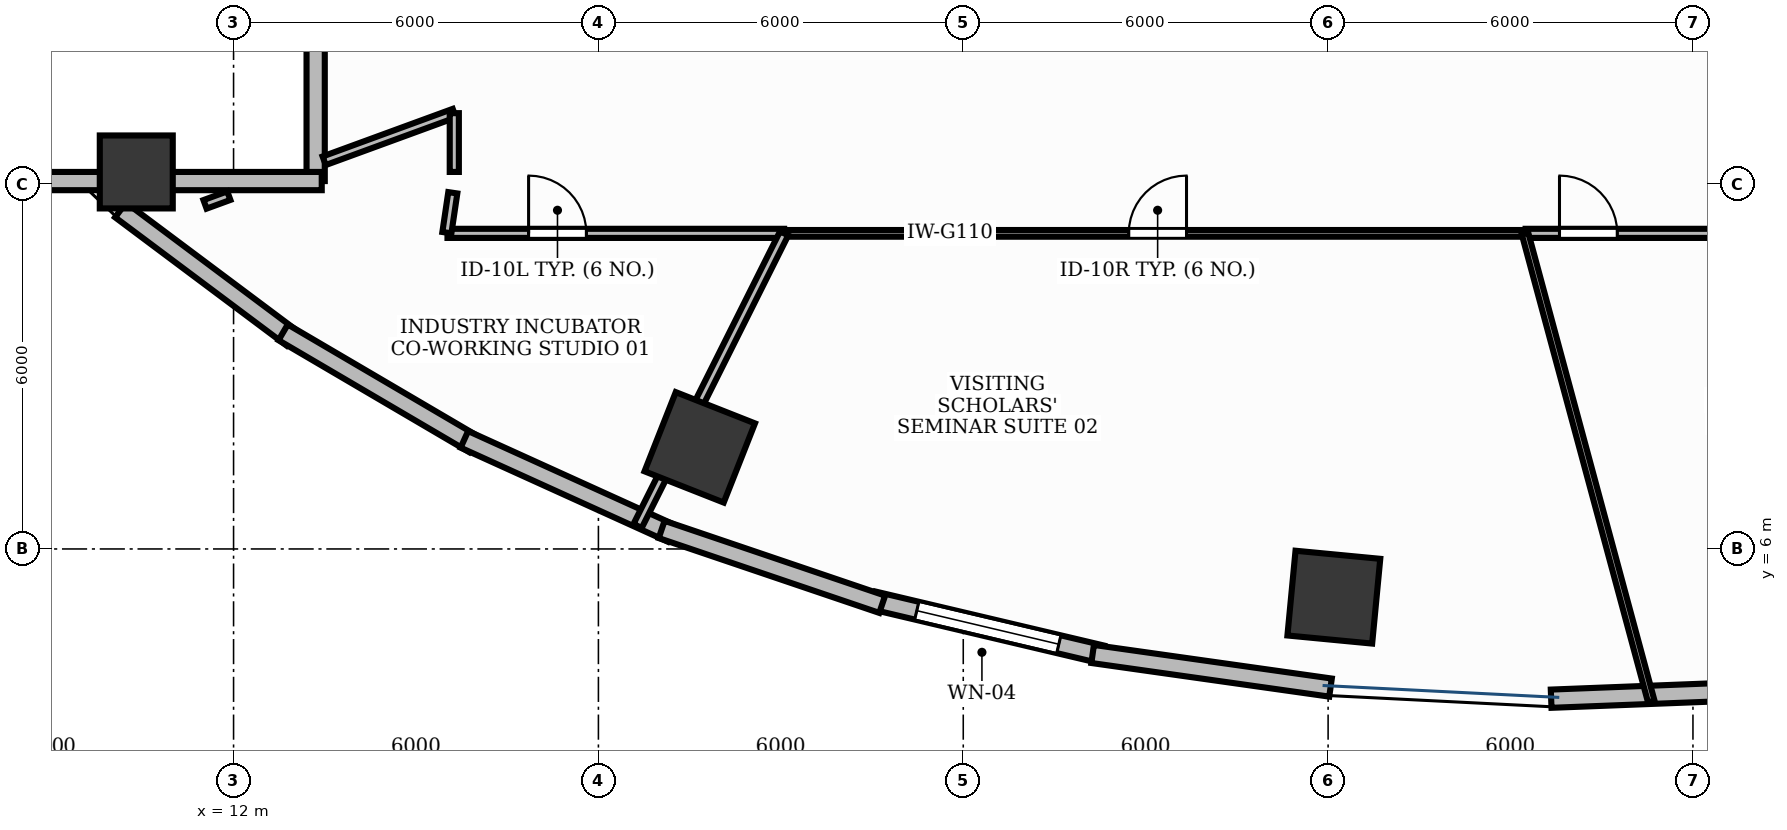
"""IFC4 building model, lengths in metres.
Left out: names, types, materials, properties, quantities, classifications, styles, units other than length and angle.
Written with IfcOpenShell. Run it as: python <this file> out.ifc"""

import sys

from ifc_helpers import new_model, si_unit, direction, frame, frame_2d, origin, origin_2d, place, context, subcontext, project, spatial, rectangle, extrude, element, fill, save


model = new_model("IFC4")
c1 = context("Model", 3, precision=1e-05, world=origin(), true_north=direction((0.0, 1.0)))
c2 = subcontext(c1, "Body", "Model", "MODEL_VIEW")
j1 = project(units=[si_unit("LENGTHUNIT", "METRE"), si_unit("PLANEANGLEUNIT", "RADIAN")], contexts=[c1])
p1 = place(None, origin())
s1 = spatial("IfcSite", under=j1, at=p1, CompositionType="ELEMENT")
p2 = place(p1, origin())
s2 = spatial("IfcBuilding", under=s1, at=p2, CompositionType="ELEMENT")
p3 = place(p2, frame((0.0, 0.0, 15.0)))
s3 = spatial("IfcBuildingStorey", under=s2, at=p3, CompositionType="ELEMENT", Elevation=15.0)
p4 = place(p3, frame((10.4, 12.2, -0.35), z_axis=(0.0, 0.0, 1.0), x_axis=(1.0, 0.0, 0.0)))
e1 = element("IfcColumn", 1, at=p4, inside=s3, PredefinedType="COLUMN", context=c2, shape_type="SweptSolid", body=[
    extrude(rectangle(XDim=1.2, YDim=1.2, at=origin_2d()), origin(), (0.0, 0.0, 1.0), 3.8),
])
for number, where, z_axis, x_axis in (
    (2, (19.667, 7.671, -0.0), (0.0, 0.0, 1.0), (-0.93, 0.367, 0.0)),
    (3, (30.094, 5.208, -0.0), (0.0, 0.0, 1.0), (-0.995, 0.095, 0.0)),
):
    element("IfcColumn", number, at=place(p3, frame(where, z_axis=z_axis, x_axis=x_axis)), inside=s3, PredefinedType="COLUMN", context=c2, shape_type="SweptSolid", body=[
        extrude(rectangle(XDim=1.4, YDim=1.4, at=origin_2d()), origin(), (0.0, 0.0, 1.0), 5.051),
    ])
p5 = place(p3, frame((22.525, 5.153, 0.0), z_axis=(0.0, 0.0, 1.0), x_axis=(0.973186156802, -0.230018921417, 0.0)))
e4 = element("IfcWall", 4, at=p5, inside=s3, PredefinedType="STANDARD", context=c2, shape_type="SweptSolid", body=[
    extrude(rectangle(XDim=3.861, YDim=0.3, at=frame_2d((1.931, 0.0))), origin(), (0.0, 0.0, 1.0), 5.05),
])
p6 = place(p5, frame((0.731, 0.0, 1.5)))
e5 = element("IfcOpeningElement", 5, at=p6, cuts=e4, PredefinedType="OPENING", context=c2, shape_type="SweptSolid", body=[
    extrude(rectangle(XDim=2.4, YDim=1.2, at=frame_2d((1.2, 0.6))), frame((0.0, 0.165, 0.0), z_axis=(0.0, -1.0, 0.0), x_axis=(1.0, 0.0, 0.0)), (0.0, 0.0, 1.0), 0.33),
])
p7 = place(p3, frame((10.142, 11.573, 0.0), z_axis=(0.0, 0.0, 1.0), x_axis=(0.800823020995, -0.598901067827, 0.0)))
e6 = element("IfcWall", 6, at=p7, inside=s3, PredefinedType="STANDARD", context=c2, shape_type="SweptSolid", body=[
    extrude(rectangle(XDim=3.521, YDim=0.3, at=frame_2d((1.76, 0.0))), origin(), (0.0, 0.0, 1.0), 5.05),
])
p8 = place(p3, frame((12.815, 9.562, 0.0), z_axis=(0.0, 0.0, 1.0), x_axis=(0.8624654944, -0.506115867139, 0.0)))
e7 = element("IfcWall", 7, at=p8, inside=s3, PredefinedType="STANDARD", context=c2, shape_type="SweptSolid", body=[
    extrude(rectangle(XDim=3.635, YDim=0.3, at=frame_2d((1.818, 0.0))), origin(), (0.0, 0.0, 1.0), 5.05),
])
p9 = place(p3, frame((15.796, 7.802, 0.0), z_axis=(0.0, 0.0, 1.0), x_axis=(0.910623406862, -0.413237233166, 0.0)))
e8 = element("IfcWall", 8, at=p9, inside=s3, PredefinedType="STANDARD", context=c2, shape_type="SweptSolid", body=[
    extrude(rectangle(XDim=3.74, YDim=0.3, at=frame_2d((1.87, 0.0))), origin(), (0.0, 0.0, 1.0), 5.05),
])
p10 = place(p3, frame((19.04, 6.321, 0.0), z_axis=(0.0, 0.0, 1.0), x_axis=(0.94702579403, -0.321157508773, 0.0)))
e9 = element("IfcWall", 9, at=p10, inside=s3, PredefinedType="STANDARD", context=c2, shape_type="SweptSolid", body=[
    extrude(rectangle(XDim=3.83, YDim=0.3, at=frame_2d((1.915, 0.0))), origin(), (0.0, 0.0, 1.0), 5.05),
])
p11 = place(p3, frame((26.128, 4.273, 0.0), z_axis=(0.0, 0.0, 1.0), x_axis=(0.990165832998, -0.139898617443, 0.0)))
e10 = element("IfcWall", 10, at=p11, inside=s3, PredefinedType="STANDARD", context=c2, shape_type="SweptSolid", body=[
    extrude(rectangle(XDim=3.951, YDim=0.3, at=frame_2d((1.976, 0.0))), origin(), (0.0, 0.0, 1.0), 5.05),
])
p12 = place(p3, frame((33.668, 3.538, 0.0), z_axis=(0.0, 0.0, 1.0), x_axis=(0.999245411623, 0.038840794937, 0.0)))
e11 = element("IfcWall", 11, at=p12, inside=s3, PredefinedType="STANDARD", context=c2, shape_type="SweptSolid", body=[
    extrude(rectangle(XDim=3.979, YDim=0.3, at=frame_2d((1.989, 0.0))), origin(), (0.0, 0.0, 1.0), 5.05),
])
p13 = place(p3, frame((13.35, 12.05, 0.0), z_axis=(0.0, 0.0, 1.0), x_axis=(0.0, 1.0, 0.0)))
e12 = element("IfcWall", 12, at=p13, inside=s3, PredefinedType="STANDARD", context=c2, shape_type="SweptSolid", body=[
    extrude(rectangle(XDim=29.9, YDim=0.3, at=frame_2d((14.95, 0.0))), origin(), (0.0, 0.0, 1.0), 1.825),
])
p14 = place(p3, frame((8.6, 12.05, 0.0), z_axis=(0.0, 0.0, 1.0), x_axis=(1.0, 0.0, 0.0)))
e13 = element("IfcWall", 13, at=p14, inside=s3, PredefinedType="STANDARD", context=c2, shape_type="SweptSolid", body=[
    extrude(rectangle(XDim=4.85, YDim=0.3, at=frame_2d((2.425, 0.0))), origin(), (0.0, 0.0, 1.0), 1.825),
])
p15 = place(p3, frame((15.518, 11.19, 0.0), z_axis=(0.0, 0.0, 1.0), x_axis=(1.0, 0.0, 0.0)))
e14 = element("IfcWall", 14, at=p15, inside=s3, PredefinedType="PARTITIONING", context=c2, shape_type="SweptSolid", body=[
    extrude(rectangle(XDim=5.536, YDim=0.15, at=frame_2d((2.768, 0.0))), origin(), (0.0, 0.0, 1.0), 3.36),
])
p16 = place(p15, frame((1.334, 0.0, 0.0)))
e15 = element("IfcOpeningElement", 15, at=p16, cuts=e14, PredefinedType="OPENING", context=c2, shape_type="SweptSolid", body=[
    extrude(rectangle(XDim=0.95, YDim=2.15, at=frame_2d((0.475, 1.075))), frame((0.0, 0.09, 0.0), z_axis=(0.0, -1.0, 0.0), x_axis=(1.0, 0.0, 0.0)), (0.0, 0.0, 1.0), 0.18),
])
p17 = place(p3, frame((21.064, 11.19, 0.0), z_axis=(0.0, 0.0, 1.0), x_axis=(1.0, 0.0, 0.0)))
e16 = element("IfcWall", 16, at=p17, inside=s3, PredefinedType="MOVABLE", context=c2, shape_type="SweptSolid", body=[
    extrude(rectangle(XDim=12.173, YDim=0.11, at=frame_2d((6.086, 0.0))), origin(), (0.0, 0.0, 1.0), 3.36),
])
p18 = place(p17, frame((5.657, 0.0, 0.0)))
e17 = element("IfcOpeningElement", 17, at=p18, cuts=e16, PredefinedType="OPENING", context=c2, shape_type="SweptSolid", body=[
    extrude(rectangle(XDim=0.95, YDim=2.15, at=frame_2d((0.475, 1.075))), frame((0.0, 0.07, 0.0), z_axis=(0.0, -1.0, 0.0), x_axis=(1.0, 0.0, 0.0)), (0.0, 0.0, 1.0), 0.14),
])
p19 = place(p3, frame((33.248, 11.19, 0.0), z_axis=(0.0, 0.0, 1.0), x_axis=(1.0, 0.0, 0.0)))
e18 = element("IfcWall", 18, at=p19, inside=s3, PredefinedType="PARTITIONING", context=c2, shape_type="SweptSolid", body=[
    extrude(rectangle(XDim=9.0, YDim=0.15, at=frame_2d((4.5, 0.0))), origin(), (0.0, 0.0, 1.0), 3.36),
])
p20 = place(p19, frame((0.557, 0.0, 0.0)))
e19 = element("IfcOpeningElement", 19, at=p20, cuts=e18, PredefinedType="OPENING", context=c2, shape_type="SweptSolid", body=[
    extrude(rectangle(XDim=0.95, YDim=2.15, at=frame_2d((0.475, 1.075))), frame((0.0, 0.09, 0.0), z_axis=(0.0, -1.0, 0.0), x_axis=(1.0, 0.0, 0.0)), (0.0, 0.0, 1.0), 0.18),
])
p21 = place(p3, frame((11.531, 11.667, 0.0), z_axis=(0.0, 0.0, 1.0), x_axis=(0.939141305032, 0.343531089107, 0.0)))
e20 = element("IfcWall", 20, at=p21, inside=s3, PredefinedType="PARTITIONING", context=c2, shape_type="SweptSolid", body=[
    extrude(rectangle(XDim=0.417, YDim=0.15, at=frame_2d((0.208, 0.0))), origin(), (0.0, 0.0, 1.0), 3.36),
])
p22 = place(p3, frame((13.49, 12.384, 0.0), z_axis=(0.0, 0.0, 1.0), x_axis=(0.93911273323, 0.343609188302, 0.0)))
e21 = element("IfcWall", 21, at=p22, inside=s3, PredefinedType="PARTITIONING", context=c2, shape_type="SweptSolid", body=[
    extrude(rectangle(XDim=2.279, YDim=0.15, at=frame_2d((1.139, 0.0))), origin(), (0.0, 0.0, 1.0), 3.36),
])
p23 = place(p3, frame((15.63, 13.167, 0.0), z_axis=(0.0, 0.0, 1.0), x_axis=(0.0, -1.0, 0.0)))
e22 = element("IfcWall", 22, at=p23, inside=s3, PredefinedType="PARTITIONING", context=c2, shape_type="SweptSolid", body=[
    extrude(rectangle(XDim=0.967, YDim=0.15, at=frame_2d((0.483, 0.0))), origin(), (0.0, 0.0, 1.0), 3.36),
])
p24 = place(p3, frame((15.605, 11.857, 0.0), z_axis=(0.0, 0.0, 1.0), x_axis=(-0.146882189547, -0.989153993266, 0.0)))
e23 = element("IfcWall", 23, at=p24, inside=s3, PredefinedType="PARTITIONING", context=c2, shape_type="SweptSolid", body=[
    extrude(rectangle(XDim=0.663, YDim=0.15, at=frame_2d((0.332, 0.0))), origin(), (0.0, 0.0, 1.0), 3.36),
])
p25 = place(p3, frame((21.054, 11.19, 0.0), z_axis=(0.0, 0.0, 1.0), x_axis=(-0.447757899169, -0.89415483208, 0.0)))
e24 = element("IfcWall", 24, at=p25, inside=s3, PredefinedType="PARTITIONING", context=c2, shape_type="SweptSolid", body=[
    extrude(rectangle(XDim=5.382, YDim=0.15, at=frame_2d((2.691, 0.0))), origin(), (0.0, 0.0, 1.0), 3.36),
])
p26 = place(p3, frame((33.237, 11.19, 0.0), z_axis=(0.0, 0.0, 1.0), x_axis=(0.260511239905, -0.96547081462, 0.0)))
e25 = element("IfcWall", 25, at=p26, inside=s3, PredefinedType="MOVABLE", context=c2, shape_type="SweptSolid", body=[
    extrude(rectangle(XDim=7.977, YDim=0.11, at=frame_2d((3.989, 0.0))), origin(), (0.0, 0.0, 1.0), 3.36),
])
p27 = place(p6, origin())
e26 = element("IfcWindow", 26, at=p27, inside=s3, PartitioningType="DOUBLE_PANEL_HORIZONTAL", PredefinedType="WINDOW", context=c2, shape_type="SweptSolid", body=[
    extrude(rectangle(XDim=2.4, YDim=1.2, at=frame_2d((1.2, 0.6))), frame((0.0, 0.03, 0.0), z_axis=(0.0, -1.0, 0.0), x_axis=(1.0, 0.0, 0.0)), (0.0, 0.0, 1.0), 0.06),
])
fill(e5, e26)
p28 = place(p16, origin())
e27 = element("IfcDoor", 27, at=p28, inside=s3, OperationType="SINGLE_SWING_LEFT", PredefinedType="DOOR", context=c2, shape_type="SweptSolid", body=[
    extrude(rectangle(XDim=0.95, YDim=2.15, at=frame_2d((0.475, 1.075))), frame((0.0, 0.025, 0.0), z_axis=(0.0, -1.0, 0.0), x_axis=(1.0, 0.0, 0.0)), (0.0, 0.0, 1.0), 0.05),
])
fill(e15, e27)
p29 = place(p18, origin())
e28 = element("IfcDoor", 28, at=p29, inside=s3, OperationType="SINGLE_SWING_RIGHT", PredefinedType="DOOR", context=c2, shape_type="SweptSolid", body=[
    extrude(rectangle(XDim=0.95, YDim=2.15, at=frame_2d((0.475, 1.075))), frame((0.0, 0.025, 0.0), z_axis=(0.0, -1.0, 0.0), x_axis=(1.0, 0.0, 0.0)), (0.0, 0.0, 1.0), 0.05),
])
fill(e17, e28)
p30 = place(p20, origin())
e29 = element("IfcDoor", 29, at=p30, inside=s3, OperationType="SINGLE_SWING_LEFT", PredefinedType="DOOR", context=c2, shape_type="SweptSolid", body=[
    extrude(rectangle(XDim=0.95, YDim=2.15, at=frame_2d((0.475, 1.075))), frame((0.0, 0.025, 0.0), z_axis=(0.0, -1.0, 0.0), x_axis=(1.0, 0.0, 0.0)), (0.0, 0.0, 1.0), 0.05),
])
fill(e19, e29)
save(model, sys.argv[1])
